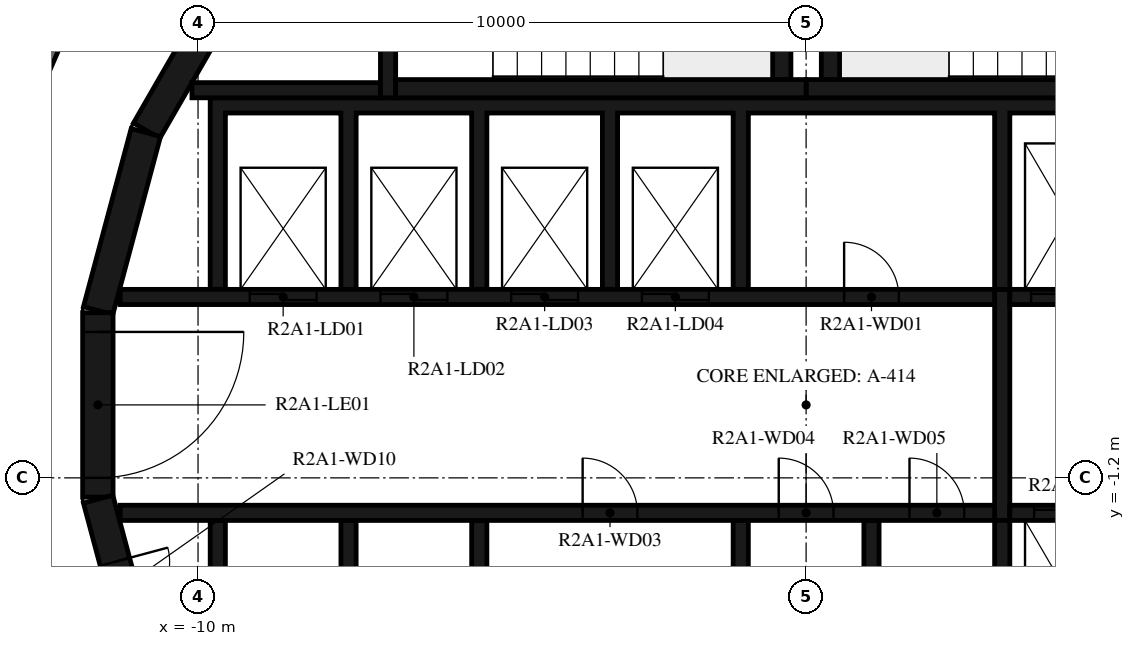
"""IFC4 building model, lengths in metres.
Left out: names, types, materials, properties, quantities, classifications, styles, units other than length and angle.
Written with IfcOpenShell. Run it as: python <this file> out.ifc"""

import sys

from ifc_helpers import new_model, si_unit, direction, frame, frame_2d, origin, place, context, subcontext, project, spatial, polyline, rectangle, outline, extrude, element, fill, save


model = new_model("IFC4")
c1 = context("Model", 3, precision=1e-05, world=origin(), true_north=direction((0.0, 1.0)))
c2 = subcontext(c1, "Body", "Model", "MODEL_VIEW")
j1 = project(units=[si_unit("LENGTHUNIT", "METRE"), si_unit("PLANEANGLEUNIT", "RADIAN")], contexts=[c1])
p1 = place(None, origin())
s1 = spatial("IfcSite", under=j1, at=p1, CompositionType="ELEMENT")
p2 = place(p1, origin())
s2 = spatial("IfcBuilding", under=s1, at=p2, CompositionType="ELEMENT")
p3 = place(p2, frame((0.0, 0.0, 80.2)))
s3 = spatial("IfcBuildingStorey", under=s2, at=p3, CompositionType="ELEMENT", Elevation=80.2)
for number, where, z_axis, x_axis in (
    (1, (-9.329, 7.137, 0.0), (0.0, 0.0, 1.0), (-0.5, -0.866, 0.0)),
    (2, (-10.858, 4.479, 0.0), (0.0, 0.0, 1.0), (-0.259, -0.966, 0.0)),
):
    element("IfcWall", number, at=place(p3, frame(where, z_axis=z_axis, x_axis=x_axis)), inside=s3, PredefinedType="SHEAR", context=c2, shape_type="SweptSolid", body=[
        extrude(rectangle(XDim=3.033, YDim=0.5, at=frame_2d((1.516, 0.0))), origin(), (0.0, 0.0, 1.0), 3.12),
    ])
p4 = place(p3, frame((-11.647, 1.516, 0.0), z_axis=(0.0, 0.0, 1.0), x_axis=(0.0, -1.0, 0.0)))
e3 = element("IfcWall", 3, at=p4, inside=s3, PredefinedType="SHEAR", context=c2, shape_type="SweptSolid", body=[
    extrude(rectangle(XDim=3.033, YDim=0.5, at=frame_2d((1.516, 0.0))), origin(), (0.0, 0.0, 1.0), 3.12),
])
p5 = place(p4, frame((0.316, 0.0, 0.0)))
e4 = element("IfcOpeningElement", 4, at=p5, cuts=e3, PredefinedType="OPENING", context=c2, shape_type="SweptSolid", body=[
    extrude(rectangle(XDim=2.4, YDim=2.1, at=frame_2d((1.2, 1.05))), frame((0.0, 0.26, 0.0), z_axis=(0.0, -1.0, 0.0), x_axis=(1.0, 0.0, 0.0)), (0.0, 0.0, 1.0), 0.52),
])
p6 = place(p3, frame((-11.643, -1.55, 0.0), z_axis=(0.0, 0.0, 1.0), x_axis=(0.258734743916, -0.965948410781, 0.0)))
e5 = element("IfcWall", 5, at=p6, inside=s3, PredefinedType="SHEAR", context=c2, shape_type="SweptSolid", body=[
    extrude(rectangle(XDim=3.033, YDim=0.5, at=frame_2d((1.516, 0.0))), origin(), (0.0, 0.0, 1.0), 3.12),
])
p7 = place(p6, frame((1.066, 0.0, 0.0)))
e6 = element("IfcOpeningElement", 6, at=p7, cuts=e5, PredefinedType="OPENING", context=c2, shape_type="SweptSolid", body=[
    extrude(rectangle(XDim=0.9, YDim=2.1, at=frame_2d((0.45, 1.05))), frame((0.0, 0.26, 0.0), z_axis=(0.0, -1.0, 0.0), x_axis=(1.0, 0.0, 0.0)), (0.0, 0.0, 1.0), 0.52),
])
p8 = place(p3, frame((0.0, 5.2, 0.0), z_axis=(0.0, 0.0, 1.0), x_axis=(1.0, 0.0, 0.0)))
e7 = element("IfcWall", 7, at=p8, inside=s3, PredefinedType="SHEAR", context=c2, shape_type="SweptSolid", body=[
    extrude(rectangle(XDim=6.75, YDim=0.3, at=frame_2d((3.375, 0.0))), origin(), (0.0, 0.0, 1.0), 3.12),
])
p9 = place(p3, frame((0.4, 5.35, 0.0), z_axis=(0.0, 0.0, 1.0), x_axis=(0.0, 1.0, 0.0)))
e8 = element("IfcWall", 8, at=p9, inside=s3, PredefinedType="SHEAR", context=c2, shape_type="SweptSolid", body=[
    extrude(rectangle(XDim=3.32, YDim=0.3, at=frame_2d((1.66, 0.0))), origin(), (0.0, 0.0, 1.0), 3.12),
])
p10 = place(p3, frame((-6.75, 5.2, 0.0), z_axis=(0.0, 0.0, 1.0), x_axis=(1.0, 0.0, 0.0)))
e9 = element("IfcWall", 9, at=p10, inside=s3, PredefinedType="SHEAR", context=c2, shape_type="SweptSolid", body=[
    extrude(rectangle(XDim=6.75, YDim=0.3, at=frame_2d((3.375, 0.0))), origin(), (0.0, 0.0, 1.0), 3.12),
])
p11 = place(p3, frame((-0.4, 5.35, 0.0), z_axis=(0.0, 0.0, 1.0), x_axis=(0.0, 1.0, 0.0)))
e10 = element("IfcWall", 10, at=p11, inside=s3, PredefinedType="SHEAR", context=c2, shape_type="SweptSolid", body=[
    extrude(rectangle(XDim=3.32, YDim=0.3, at=frame_2d((1.66, 0.0))), origin(), (0.0, 0.0, 1.0), 3.12),
])
p12 = place(p3, frame((-6.875, 8.97, 0.0), z_axis=(0.0, 0.0, 1.0), x_axis=(0.0, -1.0, 0.0)))
e11 = element("IfcWall", 11, at=p12, inside=s3, PredefinedType="SHEAR", context=c2, shape_type="SweptSolid", body=[
    extrude(rectangle(XDim=3.92, YDim=0.25, at=frame_2d((1.96, 0.0))), origin(), (0.0, 0.0, 1.0), 3.12),
])
p13 = place(p12, frame((1.61, 0.0, 0.0)))
e12 = element("IfcOpeningElement", 12, at=p13, cuts=e11, PredefinedType="OPENING", context=c2, shape_type="SweptSolid", body=[
    extrude(rectangle(XDim=1.2, YDim=2.1, at=frame_2d((0.6, 1.05))), frame((0.0, 0.135, 0.0), z_axis=(0.0, -1.0, 0.0), x_axis=(1.0, 0.0, 0.0)), (0.0, 0.0, 1.0), 0.27),
])
p14 = place(p3, frame((-7.0, 5.175, 0.0), z_axis=(0.0, 0.0, 1.0), x_axis=(-1.0, 0.0, 0.0)))
e13 = element("IfcWall", 13, at=p14, inside=s3, PredefinedType="SHEAR", context=c2, shape_type="SweptSolid", body=[
    extrude(rectangle(XDim=3.1, YDim=0.25, at=frame_2d((1.55, 0.0))), origin(), (0.0, 0.0, 1.0), 3.12),
])
p15 = place(p3, origin())
e14 = element("IfcWall", 14, at=p15, inside=s3, PredefinedType="SHEAR", context=c2, shape_type="SweptSolid", body=[
    extrude(outline(polyline([(-9.55, 4.8), (-7.65, 4.8), (-7.65, 1.9), (-7.4, 1.9), (-7.4, 4.8), (-5.5, 4.8), (-5.5, 1.9), (-5.25, 1.9), (-5.25, 4.8), (-3.35, 4.8), (-3.35, 1.9), (-3.1, 1.9), (-3.1, 4.8), (-1.2, 4.8), (-1.2, 1.9), (-0.95, 1.9), (-0.95, 4.8), (3.1, 4.8), (3.1, 1.9), (3.35, 1.9), (3.35, 4.8), (5.25, 4.8), (5.25, 1.9), (5.5, 1.9), (5.5, 4.8), (7.4, 4.8), (7.4, 1.9), (7.65, 1.9), (7.65, 4.8), (9.55, 4.8), (9.55, 1.9), (9.8, 1.9), (9.8, 4.8), (9.8, 5.05), (-9.8, 5.05), (-9.8, 4.8), (-9.8, 1.9), (-9.55, 1.9), (-9.55, 4.8)])), origin(), (0.0, 0.0, 1.0), 3.12),
])
p16 = place(p3, origin())
e15 = element("IfcWall", 15, at=p16, inside=s3, PredefinedType="SHEAR", context=c2, shape_type="SweptSolid", body=[
    extrude(outline(polyline([(9.8, -5.05), (9.8, -4.8), (9.8, -1.9), (9.55, -1.9), (9.55, -4.8), (7.65, -4.8), (7.65, -1.9), (7.4, -1.9), (7.4, -4.8), (5.5, -4.8), (5.5, -1.9), (5.25, -1.9), (5.25, -4.8), (3.35, -4.8), (3.35, -1.9), (3.1, -1.9), (3.1, -4.8), (1.2, -4.8), (1.2, -1.9), (0.95, -1.9), (0.95, -4.8), (-0.95, -4.8), (-0.95, -1.9), (-1.2, -1.9), (-1.2, -4.8), (-5.25, -4.8), (-5.25, -1.9), (-5.5, -1.9), (-5.5, -4.8), (-7.4, -4.8), (-7.4, -1.9), (-7.65, -1.9), (-7.65, -4.8), (-9.55, -4.8), (-9.55, -1.9), (-9.8, -1.9), (-9.8, -4.8), (-9.8, -5.05), (9.8, -5.05)])), origin(), (0.0, 0.0, 1.0), 3.12),
])
p17 = place(p3, frame((-11.28, 1.775, 0.0), z_axis=(0.0, 0.0, 1.0), x_axis=(1.0, 0.0, 0.0)))
e16 = element("IfcWall", 16, at=p17, inside=s3, PredefinedType="SHEAR", context=c2, shape_type="SweptSolid", body=[
    extrude(rectangle(XDim=14.38, YDim=0.25, at=frame_2d((7.19, 0.0))), origin(), (0.0, 0.0, 1.0), 3.12),
])
p18 = place(p17, frame((2.13, 0.0, 0.0)))
e17 = element("IfcOpeningElement", 17, at=p18, cuts=e16, PredefinedType="OPENING", context=c2, shape_type="SweptSolid", body=[
    extrude(rectangle(XDim=1.1, YDim=2.1, at=frame_2d((0.55, 1.05))), frame((0.0, 0.135, 0.0), z_axis=(0.0, -1.0, 0.0), x_axis=(1.0, 0.0, 0.0)), (0.0, 0.0, 1.0), 0.27),
])
p19 = place(p17, frame((4.28, 0.0, 0.0)))
e18 = element("IfcOpeningElement", 18, at=p19, cuts=e16, PredefinedType="OPENING", context=c2, shape_type="SweptSolid", body=[
    extrude(rectangle(XDim=1.1, YDim=2.1, at=frame_2d((0.55, 1.05))), frame((0.0, 0.135, 0.0), z_axis=(0.0, -1.0, 0.0), x_axis=(1.0, 0.0, 0.0)), (0.0, 0.0, 1.0), 0.27),
])
p20 = place(p17, frame((6.43, 0.0, 0.0)))
e19 = element("IfcOpeningElement", 19, at=p20, cuts=e16, PredefinedType="OPENING", context=c2, shape_type="SweptSolid", body=[
    extrude(rectangle(XDim=1.1, YDim=2.1, at=frame_2d((0.55, 1.05))), frame((0.0, 0.135, 0.0), z_axis=(0.0, -1.0, 0.0), x_axis=(1.0, 0.0, 0.0)), (0.0, 0.0, 1.0), 0.27),
])
p21 = place(p17, frame((8.58, 0.0, 0.0)))
e20 = element("IfcOpeningElement", 20, at=p21, cuts=e16, PredefinedType="OPENING", context=c2, shape_type="SweptSolid", body=[
    extrude(rectangle(XDim=1.1, YDim=2.1, at=frame_2d((0.55, 1.05))), frame((0.0, 0.135, 0.0), z_axis=(0.0, -1.0, 0.0), x_axis=(1.0, 0.0, 0.0)), (0.0, 0.0, 1.0), 0.27),
])
p22 = place(p17, frame((11.905, 0.0, 0.0)))
e21 = element("IfcOpeningElement", 21, at=p22, cuts=e16, PredefinedType="OPENING", context=c2, shape_type="SweptSolid", body=[
    extrude(rectangle(XDim=0.9, YDim=2.1, at=frame_2d((0.45, 1.05))), frame((0.0, 0.135, 0.0), z_axis=(0.0, -1.0, 0.0), x_axis=(1.0, 0.0, 0.0)), (0.0, 0.0, 1.0), 0.27),
])
p23 = place(p3, frame((3.35, 1.775, 0.0), z_axis=(0.0, 0.0, 1.0), x_axis=(1.0, 0.0, 0.0)))
e22 = element("IfcWall", 22, at=p23, inside=s3, PredefinedType="SHEAR", context=c2, shape_type="SweptSolid", body=[
    extrude(rectangle(XDim=7.93, YDim=0.25, at=frame_2d((3.965, 0.0))), origin(), (0.0, 0.0, 1.0), 3.12),
])
p24 = place(p23, frame((0.35, 0.0, 0.0)))
e23 = element("IfcOpeningElement", 23, at=p24, cuts=e22, PredefinedType="OPENING", context=c2, shape_type="SweptSolid", body=[
    extrude(rectangle(XDim=1.2, YDim=2.4, at=frame_2d((0.6, 1.2))), frame((0.0, 0.135, 0.0), z_axis=(0.0, -1.0, 0.0), x_axis=(1.0, 0.0, 0.0)), (0.0, 0.0, 1.0), 0.27),
])
p25 = place(p23, frame((2.5, 0.0, 0.0)))
e24 = element("IfcOpeningElement", 24, at=p25, cuts=e22, PredefinedType="OPENING", context=c2, shape_type="SweptSolid", body=[
    extrude(rectangle(XDim=1.2, YDim=2.4, at=frame_2d((0.6, 1.2))), frame((0.0, 0.135, 0.0), z_axis=(0.0, -1.0, 0.0), x_axis=(1.0, 0.0, 0.0)), (0.0, 0.0, 1.0), 0.27),
])
p26 = place(p23, frame((4.8, 0.0, 0.0)))
e25 = element("IfcOpeningElement", 25, at=p26, cuts=e22, PredefinedType="OPENING", context=c2, shape_type="SweptSolid", body=[
    extrude(rectangle(XDim=0.9, YDim=2.1, at=frame_2d((0.45, 1.05))), frame((0.0, 0.135, 0.0), z_axis=(0.0, -1.0, 0.0), x_axis=(1.0, 0.0, 0.0)), (0.0, 0.0, 1.0), 0.27),
])
p27 = place(p3, frame((-11.28, -1.775, 0.0), z_axis=(0.0, 0.0, 1.0), x_axis=(1.0, 0.0, 0.0)))
e26 = element("IfcWall", 26, at=p27, inside=s3, PredefinedType="SHEAR", context=c2, shape_type="SweptSolid", body=[
    extrude(rectangle(XDim=14.38, YDim=0.25, at=frame_2d((7.19, 0.0))), origin(), (0.0, 0.0, 1.0), 3.12),
])
p28 = place(p27, frame((7.605, 0.0, 0.0)))
e27 = element("IfcOpeningElement", 27, at=p28, cuts=e26, PredefinedType="OPENING", context=c2, shape_type="SweptSolid", body=[
    extrude(rectangle(XDim=0.9, YDim=2.1, at=frame_2d((0.45, 1.05))), frame((0.0, 0.135, 0.0), z_axis=(0.0, -1.0, 0.0), x_axis=(1.0, 0.0, 0.0)), (0.0, 0.0, 1.0), 0.27),
])
p29 = place(p27, frame((10.83, 0.0, 0.0)))
e28 = element("IfcOpeningElement", 28, at=p29, cuts=e26, PredefinedType="OPENING", context=c2, shape_type="SweptSolid", body=[
    extrude(rectangle(XDim=0.9, YDim=2.1, at=frame_2d((0.45, 1.05))), frame((0.0, 0.135, 0.0), z_axis=(0.0, -1.0, 0.0), x_axis=(1.0, 0.0, 0.0)), (0.0, 0.0, 1.0), 0.27),
])
p30 = place(p27, frame((12.98, 0.0, 0.0)))
e29 = element("IfcOpeningElement", 29, at=p30, cuts=e26, PredefinedType="OPENING", context=c2, shape_type="SweptSolid", body=[
    extrude(rectangle(XDim=0.9, YDim=2.1, at=frame_2d((0.45, 1.05))), frame((0.0, 0.135, 0.0), z_axis=(0.0, -1.0, 0.0), x_axis=(1.0, 0.0, 0.0)), (0.0, 0.0, 1.0), 0.27),
])
p31 = place(p3, frame((3.35, -1.775, 0.0), z_axis=(0.0, 0.0, 1.0), x_axis=(1.0, 0.0, 0.0)))
e30 = element("IfcWall", 30, at=p31, inside=s3, PredefinedType="SHEAR", context=c2, shape_type="SweptSolid", body=[
    extrude(rectangle(XDim=7.93, YDim=0.25, at=frame_2d((3.965, 0.0))), origin(), (0.0, 0.0, 1.0), 3.12),
])
p32 = place(p31, frame((0.4, 0.0, 0.0)))
e31 = element("IfcOpeningElement", 31, at=p32, cuts=e30, PredefinedType="OPENING", context=c2, shape_type="SweptSolid", body=[
    extrude(rectangle(XDim=1.1, YDim=2.4, at=frame_2d((0.55, 1.2))), frame((0.0, 0.135, 0.0), z_axis=(0.0, -1.0, 0.0), x_axis=(1.0, 0.0, 0.0)), (0.0, 0.0, 1.0), 0.27),
])
p33 = place(p31, frame((2.55, 0.0, 0.0)))
e32 = element("IfcOpeningElement", 32, at=p33, cuts=e30, PredefinedType="OPENING", context=c2, shape_type="SweptSolid", body=[
    extrude(rectangle(XDim=1.1, YDim=2.4, at=frame_2d((0.55, 1.2))), frame((0.0, 0.135, 0.0), z_axis=(0.0, -1.0, 0.0), x_axis=(1.0, 0.0, 0.0)), (0.0, 0.0, 1.0), 0.27),
])
p34 = place(p31, frame((4.7, 0.0, 0.0)))
e33 = element("IfcOpeningElement", 33, at=p34, cuts=e30, PredefinedType="OPENING", context=c2, shape_type="SweptSolid", body=[
    extrude(rectangle(XDim=1.1, YDim=2.4, at=frame_2d((0.55, 1.2))), frame((0.0, 0.135, 0.0), z_axis=(0.0, -1.0, 0.0), x_axis=(1.0, 0.0, 0.0)), (0.0, 0.0, 1.0), 0.27),
])
p35 = place(p3, frame((3.225, -1.9, 0.0), z_axis=(0.0, 0.0, 1.0), x_axis=(0.0, 1.0, 0.0)))
e34 = element("IfcWall", 34, at=p35, inside=s3, PredefinedType="SHEAR", context=c2, shape_type="SweptSolid", body=[
    extrude(rectangle(XDim=3.8, YDim=0.25, at=frame_2d((1.9, 0.0))), origin(), (0.0, 0.0, 1.0), 3.12),
])
p36 = place(p3, frame((-11.1, 8.829, 0.0), z_axis=(0.0, 0.0, 1.0), x_axis=(-0.398741918631, -0.917063183388, 0.0)))
e35 = element("IfcWall", 35, at=p36, inside=s3, PredefinedType="STANDARD", context=c2, shape_type="SweptSolid", body=[
    extrude(rectangle(XDim=7.342, YDim=0.2, at=frame_2d((3.671, 0.0))), origin(), (0.0, 0.0, 1.0), 3.12),
])
p37 = place(p5, origin())
e36 = element("IfcDoor", 36, at=p37, inside=s3, OperationType="DOUBLE_DOOR_SINGLE_SWING", PredefinedType="DOOR", context=c2, shape_type="SweptSolid", body=[
    extrude(rectangle(XDim=2.4, YDim=2.1, at=frame_2d((1.2, 1.05))), frame((0.0, 0.025, 0.0), z_axis=(0.0, -1.0, 0.0), x_axis=(1.0, 0.0, 0.0)), (0.0, 0.0, 1.0), 0.05),
])
fill(e4, e36)
p38 = place(p18, origin())
e37 = element("IfcDoor", 37, at=p38, inside=s3, OperationType="DOUBLE_DOOR_SLIDING", PredefinedType="DOOR", context=c2, shape_type="SweptSolid", body=[
    extrude(rectangle(XDim=1.1, YDim=2.1, at=frame_2d((0.55, 1.05))), frame((0.0, 0.025, 0.0), z_axis=(0.0, -1.0, 0.0), x_axis=(1.0, 0.0, 0.0)), (0.0, 0.0, 1.0), 0.05),
])
fill(e17, e37)
p39 = place(p19, origin())
e38 = element("IfcDoor", 38, at=p39, inside=s3, OperationType="DOUBLE_DOOR_SLIDING", PredefinedType="DOOR", context=c2, shape_type="SweptSolid", body=[
    extrude(rectangle(XDim=1.1, YDim=2.1, at=frame_2d((0.55, 1.05))), frame((0.0, 0.025, 0.0), z_axis=(0.0, -1.0, 0.0), x_axis=(1.0, 0.0, 0.0)), (0.0, 0.0, 1.0), 0.05),
])
fill(e18, e38)
p40 = place(p20, origin())
e39 = element("IfcDoor", 39, at=p40, inside=s3, OperationType="DOUBLE_DOOR_SLIDING", PredefinedType="DOOR", context=c2, shape_type="SweptSolid", body=[
    extrude(rectangle(XDim=1.1, YDim=2.1, at=frame_2d((0.55, 1.05))), frame((0.0, 0.025, 0.0), z_axis=(0.0, -1.0, 0.0), x_axis=(1.0, 0.0, 0.0)), (0.0, 0.0, 1.0), 0.05),
])
fill(e19, e39)
p41 = place(p21, origin())
e40 = element("IfcDoor", 40, at=p41, inside=s3, OperationType="DOUBLE_DOOR_SLIDING", PredefinedType="DOOR", context=c2, shape_type="SweptSolid", body=[
    extrude(rectangle(XDim=1.1, YDim=2.1, at=frame_2d((0.55, 1.05))), frame((0.0, 0.025, 0.0), z_axis=(0.0, -1.0, 0.0), x_axis=(1.0, 0.0, 0.0)), (0.0, 0.0, 1.0), 0.05),
])
fill(e20, e40)
p42 = place(p24, origin())
e41 = element("IfcDoor", 41, at=p42, inside=s3, OperationType="DOUBLE_DOOR_SLIDING", PredefinedType="DOOR", context=c2, shape_type="SweptSolid", body=[
    extrude(rectangle(XDim=1.2, YDim=2.4, at=frame_2d((0.6, 1.2))), frame((0.0, 0.025, 0.0), z_axis=(0.0, -1.0, 0.0), x_axis=(1.0, 0.0, 0.0)), (0.0, 0.0, 1.0), 0.05),
])
fill(e23, e41)
p43 = place(p32, origin())
e42 = element("IfcDoor", 42, at=p43, inside=s3, OperationType="DOUBLE_DOOR_SLIDING", PredefinedType="DOOR", context=c2, shape_type="SweptSolid", body=[
    extrude(rectangle(XDim=1.1, YDim=2.4, at=frame_2d((0.55, 1.2))), frame((0.0, 0.025, 0.0), z_axis=(0.0, -1.0, 0.0), x_axis=(1.0, 0.0, 0.0)), (0.0, 0.0, 1.0), 0.05),
])
fill(e31, e42)
p44 = place(p22, origin())
e43 = element("IfcDoor", 43, at=p44, inside=s3, OperationType="SINGLE_SWING_RIGHT", PredefinedType="DOOR", context=c2, shape_type="SweptSolid", body=[
    extrude(rectangle(XDim=0.9, YDim=2.1, at=frame_2d((0.45, 1.05))), frame((0.0, 0.025, 0.0), z_axis=(0.0, -1.0, 0.0), x_axis=(1.0, 0.0, 0.0)), (0.0, 0.0, 1.0), 0.05),
])
fill(e21, e43)
p45 = place(p28, origin())
e44 = element("IfcDoor", 44, at=p45, inside=s3, OperationType="SINGLE_SWING_RIGHT", PredefinedType="DOOR", context=c2, shape_type="SweptSolid", body=[
    extrude(rectangle(XDim=0.9, YDim=2.1, at=frame_2d((0.45, 1.05))), frame((0.0, 0.025, 0.0), z_axis=(0.0, -1.0, 0.0), x_axis=(1.0, 0.0, 0.0)), (0.0, 0.0, 1.0), 0.05),
])
fill(e27, e44)
p46 = place(p29, origin())
e45 = element("IfcDoor", 45, at=p46, inside=s3, OperationType="SINGLE_SWING_LEFT", PredefinedType="DOOR", context=c2, shape_type="SweptSolid", body=[
    extrude(rectangle(XDim=0.9, YDim=2.1, at=frame_2d((0.45, 1.05))), frame((0.0, 0.025, 0.0), z_axis=(0.0, -1.0, 0.0), x_axis=(1.0, 0.0, 0.0)), (0.0, 0.0, 1.0), 0.05),
])
fill(e28, e45)
p47 = place(p30, origin())
e46 = element("IfcDoor", 46, at=p47, inside=s3, OperationType="SINGLE_SWING_RIGHT", PredefinedType="DOOR", context=c2, shape_type="SweptSolid", body=[
    extrude(rectangle(XDim=0.9, YDim=2.1, at=frame_2d((0.45, 1.05))), frame((0.0, 0.025, 0.0), z_axis=(0.0, -1.0, 0.0), x_axis=(1.0, 0.0, 0.0)), (0.0, 0.0, 1.0), 0.05),
])
fill(e29, e46)
p48 = place(p7, origin())
e47 = element("IfcDoor", 47, at=p48, inside=s3, OperationType="SINGLE_SWING_LEFT", PredefinedType="DOOR", context=c2, shape_type="SweptSolid", body=[
    extrude(rectangle(XDim=0.9, YDim=2.1, at=frame_2d((0.45, 1.05))), frame((0.0, 0.025, 0.0), z_axis=(0.0, -1.0, 0.0), x_axis=(1.0, 0.0, 0.0)), (0.0, 0.0, 1.0), 0.05),
])
fill(e6, e47)
save(model, sys.argv[1])
